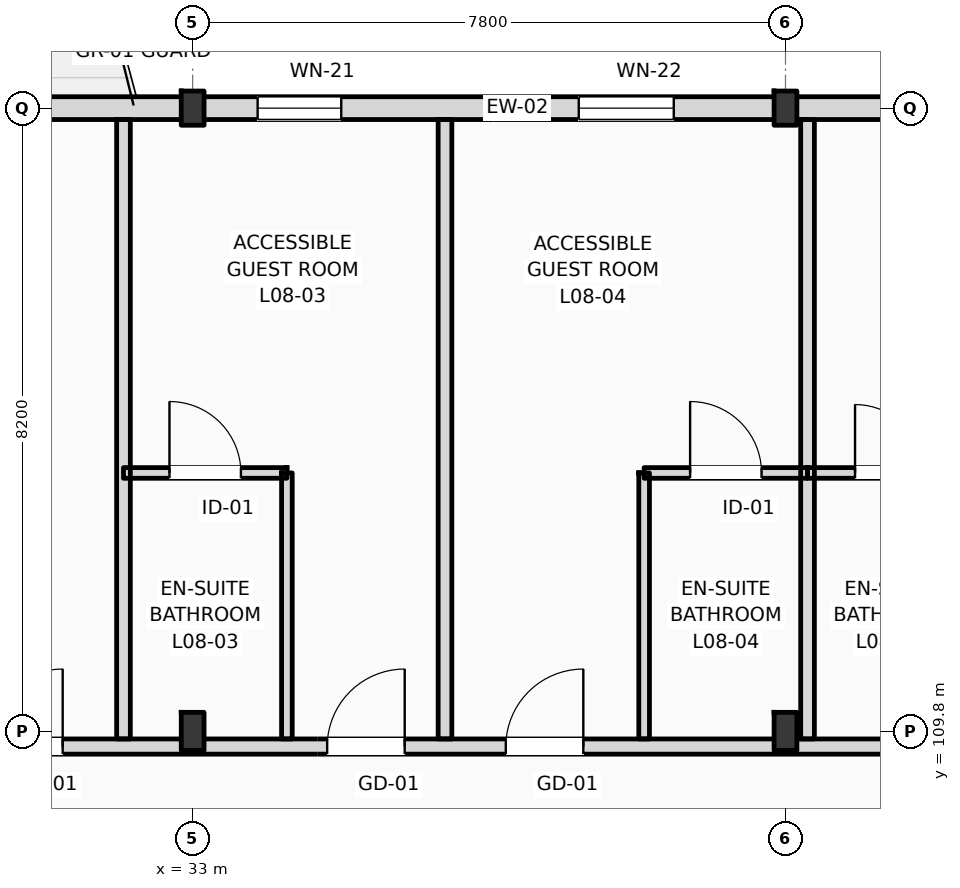
"""IFC4 building model, lengths in metres.
Left out: names, types, materials, properties, quantities, classifications, styles, units other than length and angle.
Written with IfcOpenShell. Run it as: python <this file> out.ifc"""

import sys

from ifc_helpers import new_model, si_unit, direction, frame, frame_2d, origin, origin_2d, place, context, subcontext, project, spatial, rectangle, i_section, extrude, element, fill, save


model = new_model("IFC4")
c1 = context("Model", 3, precision=1e-05, world=origin(), true_north=direction((0.0, 1.0)))
c2 = subcontext(c1, "Body", "Model", "MODEL_VIEW")
j1 = project(units=[si_unit("LENGTHUNIT", "METRE"), si_unit("PLANEANGLEUNIT", "RADIAN")], contexts=[c1])
p1 = place(None, origin())
s1 = spatial("IfcSite", under=j1, at=p1, CompositionType="ELEMENT")
p2 = place(p1, origin())
s2 = spatial("IfcBuilding", under=s1, at=p2, CompositionType="ELEMENT")
p3 = place(p2, frame((0.0, 0.0, 35.4)))
s3 = spatial("IfcBuildingStorey", under=s2, at=p3, CompositionType="ELEMENT", Elevation=35.4)
p4 = place(p3, frame((33.0, 109.8, 0.0), z_axis=(0.0, 0.0, 1.0), x_axis=(1.0, 0.0, 0.0)))
e1 = element("IfcColumn", 1, at=p4, inside=s3, PredefinedType="COLUMN", context=c2, shape_type="SweptSolid", body=[
    extrude(i_section(OverallWidth=0.3, OverallDepth=0.5, WebThickness=0.014, FlangeThickness=0.028, FilletRadius=0.027, at=origin_2d()), origin(), (0.0, 0.0, 1.0), 3.6),
])
p5 = place(p3, frame((33.0, 118.0, 0.0), z_axis=(0.0, 0.0, 1.0), x_axis=(1.0, 0.0, 0.0)))
e2 = element("IfcColumn", 2, at=p5, inside=s3, PredefinedType="COLUMN", context=c2, shape_type="SweptSolid", body=[
    extrude(i_section(OverallWidth=0.3, OverallDepth=0.45, WebThickness=0.014, FlangeThickness=0.026, FilletRadius=0.027, at=origin_2d()), origin(), (0.0, 0.0, 1.0), 3.6),
])
p6 = place(p3, frame((40.8, 109.8, 0.0), z_axis=(0.0, 0.0, 1.0), x_axis=(1.0, 0.0, 0.0)))
e3 = element("IfcColumn", 3, at=p6, inside=s3, PredefinedType="COLUMN", context=c2, shape_type="SweptSolid", body=[
    extrude(i_section(OverallWidth=0.3, OverallDepth=0.5, WebThickness=0.014, FlangeThickness=0.028, FilletRadius=0.027, at=origin_2d()), origin(), (0.0, 0.0, 1.0), 3.6),
])
p7 = place(p3, frame((40.8, 118.0, 0.0), z_axis=(0.0, 0.0, 1.0), x_axis=(1.0, 0.0, 0.0)))
e4 = element("IfcColumn", 4, at=p7, inside=s3, PredefinedType="COLUMN", context=c2, shape_type="SweptSolid", body=[
    extrude(i_section(OverallWidth=0.3, OverallDepth=0.45, WebThickness=0.014, FlangeThickness=0.026, FilletRadius=0.027, at=origin_2d()), origin(), (0.0, 0.0, 1.0), 3.6),
])
p8 = place(p3, frame((22.5, 118.0, 0.0), z_axis=(0.0, 0.0, 1.0), x_axis=(1.0, 0.0, 0.0)))
e5 = element("IfcWall", 5, at=p8, inside=s3, PredefinedType="STANDARD", context=c2, shape_type="SweptSolid", body=[
    extrude(rectangle(XDim=72.9, YDim=0.3, at=frame_2d((36.45, 0.0))), origin(), (0.0, 0.0, 1.0), 2.92),
])
p9 = place(p8, frame((0.91, 0.0, 0.9)))
e6 = element("IfcOpeningElement", 6, at=p9, cuts=e5, PredefinedType="OPENING", context=c2, shape_type="SweptSolid", body=[
    extrude(rectangle(XDim=0.9, YDim=1.84, at=frame_2d((0.45, 0.92))), frame((0.0, 0.16, 0.0), z_axis=(0.0, -1.0, 0.0), x_axis=(1.0, 0.0, 0.0)), (0.0, 0.0, 1.0), 0.32),
])
p10 = place(p8, frame((6.665, 0.0, 0.0)))
e7 = element("IfcOpeningElement", 7, at=p10, cuts=e5, PredefinedType="OPENING", context=c2, shape_type="SweptSolid", body=[
    extrude(rectangle(XDim=1.2, YDim=2.25, at=frame_2d((0.6, 1.125))), frame((0.0, 0.16, 0.0), z_axis=(0.0, -1.0, 0.0), x_axis=(1.0, 0.0, 0.0)), (0.0, 0.0, 1.0), 0.32),
])
p11 = place(p8, frame((11.355, 0.0, 0.9)))
e8 = element("IfcOpeningElement", 8, at=p11, cuts=e5, PredefinedType="OPENING", context=c2, shape_type="SweptSolid", body=[
    extrude(rectangle(XDim=1.1, YDim=1.5, at=frame_2d((0.55, 0.75))), frame((0.0, 0.16, 0.0), z_axis=(0.0, -1.0, 0.0), x_axis=(1.0, 0.0, 0.0)), (0.0, 0.0, 1.0), 0.32),
])
p12 = place(p8, frame((15.58, 0.0, 0.9)))
e9 = element("IfcOpeningElement", 9, at=p12, cuts=e5, PredefinedType="OPENING", context=c2, shape_type="SweptSolid", body=[
    extrude(rectangle(XDim=1.25, YDim=1.6, at=frame_2d((0.625, 0.8))), frame((0.0, 0.16, 0.0), z_axis=(0.0, -1.0, 0.0), x_axis=(1.0, 0.0, 0.0)), (0.0, 0.0, 1.0), 0.32),
])
p13 = place(p8, frame((21.08, 0.0, 0.0)))
e10 = element("IfcOpeningElement", 10, at=p13, cuts=e5, PredefinedType="OPENING", context=c2, shape_type="SweptSolid", body=[
    extrude(rectangle(XDim=1.2, YDim=2.25, at=frame_2d((0.6, 1.125))), frame((0.0, 0.16, 0.0), z_axis=(0.0, -1.0, 0.0), x_axis=(1.0, 0.0, 0.0)), (0.0, 0.0, 1.0), 0.32),
])
p14 = place(p8, frame((23.54, 0.0, 0.0)))
e11 = element("IfcOpeningElement", 11, at=p14, cuts=e5, PredefinedType="OPENING", context=c2, shape_type="SweptSolid", body=[
    extrude(rectangle(XDim=1.2, YDim=2.25, at=frame_2d((0.6, 1.125))), frame((0.0, 0.16, 0.0), z_axis=(0.0, -1.0, 0.0), x_axis=(1.0, 0.0, 0.0)), (0.0, 0.0, 1.0), 0.32),
])
p15 = place(p8, frame((28.83, 0.0, 0.9)))
e12 = element("IfcOpeningElement", 12, at=p15, cuts=e5, PredefinedType="OPENING", context=c2, shape_type="SweptSolid", body=[
    extrude(rectangle(XDim=1.75, YDim=1.84, at=frame_2d((0.875, 0.92))), frame((0.0, 0.16, 0.0), z_axis=(0.0, -1.0, 0.0), x_axis=(1.0, 0.0, 0.0)), (0.0, 0.0, 1.0), 0.32),
])
p16 = place(p8, frame((34.805, 0.0, 0.9)))
e13 = element("IfcOpeningElement", 13, at=p16, cuts=e5, PredefinedType="OPENING", context=c2, shape_type="SweptSolid", body=[
    extrude(rectangle(XDim=1.35, YDim=1.84, at=frame_2d((0.675, 0.92))), frame((0.0, 0.16, 0.0), z_axis=(0.0, -1.0, 0.0), x_axis=(1.0, 0.0, 0.0)), (0.0, 0.0, 1.0), 0.32),
])
p17 = place(p8, frame((38.105, 0.0, 0.0)))
e14 = element("IfcOpeningElement", 14, at=p17, cuts=e5, PredefinedType="OPENING", context=c2, shape_type="SweptSolid", body=[
    extrude(rectangle(XDim=1.2, YDim=2.25, at=frame_2d((0.6, 1.125))), frame((0.0, 0.16, 0.0), z_axis=(0.0, -1.0, 0.0), x_axis=(1.0, 0.0, 0.0)), (0.0, 0.0, 1.0), 0.32),
])
p18 = place(p8, frame((42.505, 0.0, 0.9)))
e15 = element("IfcOpeningElement", 15, at=p18, cuts=e5, PredefinedType="OPENING", context=c2, shape_type="SweptSolid", body=[
    extrude(rectangle(XDim=2.6, YDim=1.84, at=frame_2d((1.3, 0.92))), frame((0.0, 0.16, 0.0), z_axis=(0.0, -1.0, 0.0), x_axis=(1.0, 0.0, 0.0)), (0.0, 0.0, 1.0), 0.32),
])
p19 = place(p8, frame((46.2, 0.0, 0.9)))
e16 = element("IfcOpeningElement", 16, at=p19, cuts=e5, PredefinedType="OPENING", context=c2, shape_type="SweptSolid", body=[
    extrude(rectangle(XDim=1.8, YDim=1.84, at=frame_2d((0.9, 0.92))), frame((0.0, 0.16, 0.0), z_axis=(0.0, -1.0, 0.0), x_axis=(1.0, 0.0, 0.0)), (0.0, 0.0, 1.0), 0.32),
])
p20 = place(p8, frame((52.565, 0.0, 0.0)))
e17 = element("IfcOpeningElement", 17, at=p20, cuts=e5, PredefinedType="OPENING", context=c2, shape_type="SweptSolid", body=[
    extrude(rectangle(XDim=1.2, YDim=2.25, at=frame_2d((0.6, 1.125))), frame((0.0, 0.16, 0.0), z_axis=(0.0, -1.0, 0.0), x_axis=(1.0, 0.0, 0.0)), (0.0, 0.0, 1.0), 0.32),
])
p21 = place(p8, frame((55.305, 0.0, 0.9)))
e18 = element("IfcOpeningElement", 18, at=p21, cuts=e5, PredefinedType="OPENING", context=c2, shape_type="SweptSolid", body=[
    extrude(rectangle(XDim=1.2, YDim=1.8, at=frame_2d((0.6, 0.9))), frame((0.0, 0.16, 0.0), z_axis=(0.0, -1.0, 0.0), x_axis=(1.0, 0.0, 0.0)), (0.0, 0.0, 1.0), 0.32),
])
p22 = place(p8, frame((60.53, 0.0, 0.9)))
e19 = element("IfcOpeningElement", 19, at=p22, cuts=e5, PredefinedType="OPENING", context=c2, shape_type="SweptSolid", body=[
    extrude(rectangle(XDim=1.35, YDim=1.84, at=frame_2d((0.675, 0.92))), frame((0.0, 0.16, 0.0), z_axis=(0.0, -1.0, 0.0), x_axis=(1.0, 0.0, 0.0)), (0.0, 0.0, 1.0), 0.32),
])
p23 = place(p8, frame((65.955, 0.0, 0.9)))
e20 = element("IfcOpeningElement", 20, at=p23, cuts=e5, PredefinedType="OPENING", context=c2, shape_type="SweptSolid", body=[
    extrude(rectangle(XDim=1.35, YDim=1.84, at=frame_2d((0.675, 0.92))), frame((0.0, 0.16, 0.0), z_axis=(0.0, -1.0, 0.0), x_axis=(1.0, 0.0, 0.0)), (0.0, 0.0, 1.0), 0.32),
])
p24 = place(p8, frame((69.335, 0.0, 0.9)))
e21 = element("IfcOpeningElement", 21, at=p24, cuts=e5, PredefinedType="OPENING", context=c2, shape_type="SweptSolid", body=[
    extrude(rectangle(XDim=1.65, YDim=1.84, at=frame_2d((0.825, 0.92))), frame((0.0, 0.16, 0.0), z_axis=(0.0, -1.0, 0.0), x_axis=(1.0, 0.0, 0.0)), (0.0, 0.0, 1.0), 0.32),
])
p25 = place(p3, frame((10.65, 109.6, 0.0), z_axis=(0.0, 0.0, 1.0), x_axis=(1.0, 0.0, 0.0)))
e22 = element("IfcWall", 22, at=p25, inside=s3, PredefinedType="PARTITIONING", context=c2, shape_type="SweptSolid", body=[
    extrude(rectangle(XDim=84.61, YDim=0.2, at=frame_2d((42.305, 0.0))), origin(), (0.0, 0.0, 1.0), 2.82),
])
p26 = place(p25, frame((12.675, 0.0, 0.0)))
e23 = element("IfcOpeningElement", 23, at=p26, cuts=e22, PredefinedType="OPENING", context=c2, shape_type="SweptSolid", body=[
    extrude(rectangle(XDim=1.02, YDim=2.2, at=frame_2d((0.51, 1.1))), frame((0.0, 0.11, 0.0), z_axis=(0.0, -1.0, 0.0), x_axis=(1.0, 0.0, 0.0)), (0.0, 0.0, 1.0), 0.22),
])
p27 = place(p25, frame((19.62, 0.0, 0.0)))
e24 = element("IfcOpeningElement", 24, at=p27, cuts=e22, PredefinedType="OPENING", context=c2, shape_type="SweptSolid", body=[
    extrude(rectangle(XDim=1.02, YDim=2.2, at=frame_2d((0.51, 1.1))), frame((0.0, 0.11, 0.0), z_axis=(0.0, -1.0, 0.0), x_axis=(1.0, 0.0, 0.0)), (0.0, 0.0, 1.0), 0.22),
])
p28 = place(p25, frame((24.12, 0.0, 0.0)))
e25 = element("IfcOpeningElement", 25, at=p28, cuts=e22, PredefinedType="OPENING", context=c2, shape_type="SweptSolid", body=[
    extrude(rectangle(XDim=1.02, YDim=2.2, at=frame_2d((0.51, 1.1))), frame((0.0, 0.11, 0.0), z_axis=(0.0, -1.0, 0.0), x_axis=(1.0, 0.0, 0.0)), (0.0, 0.0, 1.0), 0.22),
])
p29 = place(p25, frame((26.47, 0.0, 0.0)))
e26 = element("IfcOpeningElement", 26, at=p29, cuts=e22, PredefinedType="OPENING", context=c2, shape_type="SweptSolid", body=[
    extrude(rectangle(XDim=1.02, YDim=2.2, at=frame_2d((0.51, 1.1))), frame((0.0, 0.11, 0.0), z_axis=(0.0, -1.0, 0.0), x_axis=(1.0, 0.0, 0.0)), (0.0, 0.0, 1.0), 0.22),
])
p30 = place(p25, frame((33.15, 0.0, 0.0)))
e27 = element("IfcOpeningElement", 27, at=p30, cuts=e22, PredefinedType="OPENING", context=c2, shape_type="SweptSolid", body=[
    extrude(rectangle(XDim=0.96, YDim=2.2, at=frame_2d((0.48, 1.1))), frame((0.0, 0.11, 0.0), z_axis=(0.0, -1.0, 0.0), x_axis=(1.0, 0.0, 0.0)), (0.0, 0.0, 1.0), 0.22),
])
p31 = place(p25, frame((35.5, 0.0, 0.0)))
e28 = element("IfcOpeningElement", 28, at=p31, cuts=e22, PredefinedType="OPENING", context=c2, shape_type="SweptSolid", body=[
    extrude(rectangle(XDim=0.96, YDim=2.2, at=frame_2d((0.48, 1.1))), frame((0.0, 0.11, 0.0), z_axis=(0.0, -1.0, 0.0), x_axis=(1.0, 0.0, 0.0)), (0.0, 0.0, 1.0), 0.22),
])
p32 = place(p25, frame((42.15, 0.0, 0.0)))
e29 = element("IfcOpeningElement", 29, at=p32, cuts=e22, PredefinedType="OPENING", context=c2, shape_type="SweptSolid", body=[
    extrude(rectangle(XDim=0.96, YDim=2.2, at=frame_2d((0.48, 1.1))), frame((0.0, 0.11, 0.0), z_axis=(0.0, -1.0, 0.0), x_axis=(1.0, 0.0, 0.0)), (0.0, 0.0, 1.0), 0.22),
])
p33 = place(p25, frame((47.15, 0.0, 0.0)))
e30 = element("IfcOpeningElement", 30, at=p33, cuts=e22, PredefinedType="OPENING", context=c2, shape_type="SweptSolid", body=[
    extrude(rectangle(XDim=0.96, YDim=2.2, at=frame_2d((0.48, 1.1))), frame((0.0, 0.11, 0.0), z_axis=(0.0, -1.0, 0.0), x_axis=(1.0, 0.0, 0.0)), (0.0, 0.0, 1.0), 0.22),
])
p34 = place(p25, frame((51.15, 0.0, 0.0)))
e31 = element("IfcOpeningElement", 31, at=p34, cuts=e22, PredefinedType="OPENING", context=c2, shape_type="SweptSolid", body=[
    extrude(rectangle(XDim=0.96, YDim=2.2, at=frame_2d((0.48, 1.1))), frame((0.0, 0.11, 0.0), z_axis=(0.0, -1.0, 0.0), x_axis=(1.0, 0.0, 0.0)), (0.0, 0.0, 1.0), 0.22),
])
p35 = place(p25, frame((55.65, 0.0, 0.0)))
e32 = element("IfcOpeningElement", 32, at=p35, cuts=e22, PredefinedType="OPENING", context=c2, shape_type="SweptSolid", body=[
    extrude(rectangle(XDim=0.96, YDim=2.2, at=frame_2d((0.48, 1.1))), frame((0.0, 0.11, 0.0), z_axis=(0.0, -1.0, 0.0), x_axis=(1.0, 0.0, 0.0)), (0.0, 0.0, 1.0), 0.22),
])
p36 = place(p25, frame((58.0, 0.0, 0.0)))
e33 = element("IfcOpeningElement", 33, at=p36, cuts=e22, PredefinedType="OPENING", context=c2, shape_type="SweptSolid", body=[
    extrude(rectangle(XDim=0.96, YDim=2.2, at=frame_2d((0.48, 1.1))), frame((0.0, 0.11, 0.0), z_axis=(0.0, -1.0, 0.0), x_axis=(1.0, 0.0, 0.0)), (0.0, 0.0, 1.0), 0.22),
])
p37 = place(p25, frame((64.65, 0.0, 0.0)))
e34 = element("IfcOpeningElement", 34, at=p37, cuts=e22, PredefinedType="OPENING", context=c2, shape_type="SweptSolid", body=[
    extrude(rectangle(XDim=0.96, YDim=2.2, at=frame_2d((0.48, 1.1))), frame((0.0, 0.11, 0.0), z_axis=(0.0, -1.0, 0.0), x_axis=(1.0, 0.0, 0.0)), (0.0, 0.0, 1.0), 0.22),
])
p38 = place(p25, frame((66.75, 0.0, 0.0)))
e35 = element("IfcOpeningElement", 35, at=p38, cuts=e22, PredefinedType="OPENING", context=c2, shape_type="SweptSolid", body=[
    extrude(rectangle(XDim=0.96, YDim=2.2, at=frame_2d((0.48, 1.1))), frame((0.0, 0.11, 0.0), z_axis=(0.0, -1.0, 0.0), x_axis=(1.0, 0.0, 0.0)), (0.0, 0.0, 1.0), 0.22),
])
p39 = place(p25, frame((73.65, 0.0, 0.0)))
e36 = element("IfcOpeningElement", 36, at=p39, cuts=e22, PredefinedType="OPENING", context=c2, shape_type="SweptSolid", body=[
    extrude(rectangle(XDim=0.96, YDim=2.2, at=frame_2d((0.48, 1.1))), frame((0.0, 0.11, 0.0), z_axis=(0.0, -1.0, 0.0), x_axis=(1.0, 0.0, 0.0)), (0.0, 0.0, 1.0), 0.22),
])
p40 = place(p25, frame((78.4, 0.0, 0.0)))
e37 = element("IfcOpeningElement", 37, at=p40, cuts=e22, PredefinedType="OPENING", context=c2, shape_type="SweptSolid", body=[
    extrude(rectangle(XDim=0.96, YDim=2.2, at=frame_2d((0.48, 1.1))), frame((0.0, 0.11, 0.0), z_axis=(0.0, -1.0, 0.0), x_axis=(1.0, 0.0, 0.0)), (0.0, 0.0, 1.0), 0.22),
])
p41 = place(p25, frame((80.455, 0.0, 0.0)))
e38 = element("IfcOpeningElement", 38, at=p41, cuts=e22, PredefinedType="OPENING", context=c2, shape_type="SweptSolid", body=[
    extrude(rectangle(XDim=0.96, YDim=2.2, at=frame_2d((0.48, 1.1))), frame((0.0, 0.11, 0.0), z_axis=(0.0, -1.0, 0.0), x_axis=(1.0, 0.0, 0.0)), (0.0, 0.0, 1.0), 0.22),
])
p42 = place(p25, frame((2.716, 0.0, 0.0)))
e39 = element("IfcOpeningElement", 39, at=p42, cuts=e22, PredefinedType="OPENING", context=c2, shape_type="SweptSolid", body=[
    extrude(rectangle(XDim=1.35, YDim=2.25, at=frame_2d((0.675, 1.125))), frame((0.0, 0.11, 0.0), z_axis=(0.0, -1.0, 0.0), x_axis=(1.0, 0.0, 0.0)), (0.0, 0.0, 1.0), 0.22),
])
p43 = place(p25, frame((6.65, 0.0, 0.0)))
e40 = element("IfcOpeningElement", 40, at=p43, cuts=e22, PredefinedType="OPENING", context=c2, shape_type="SweptSolid", body=[
    extrude(rectangle(XDim=1.35, YDim=2.25, at=frame_2d((0.675, 1.125))), frame((0.0, 0.11, 0.0), z_axis=(0.0, -1.0, 0.0), x_axis=(1.0, 0.0, 0.0)), (0.0, 0.0, 1.0), 0.22),
])
p44 = place(p25, frame((10.583, 0.0, 0.0)))
e41 = element("IfcOpeningElement", 41, at=p44, cuts=e22, PredefinedType="OPENING", context=c2, shape_type="SweptSolid", body=[
    extrude(rectangle(XDim=1.35, YDim=2.25, at=frame_2d((0.675, 1.125))), frame((0.0, 0.11, 0.0), z_axis=(0.0, -1.0, 0.0), x_axis=(1.0, 0.0, 0.0)), (0.0, 0.0, 1.0), 0.22),
])
for number, where, z_axis, x_axis in (
    (42, (32.09, 109.7, 0.0), (0.0, 0.0, 1.0), (0.0, 1.0, 0.0)),
    (43, (36.32, 109.7, 0.0), (0.0, 0.0, 1.0), (0.0, 1.0, 0.0)),
):
    element("IfcWall", number, at=place(p3, frame(where, z_axis=z_axis, x_axis=x_axis)), inside=s3, PredefinedType="PARTITIONING", context=c2, shape_type="SweptSolid", body=[
        extrude(rectangle(XDim=8.15, YDim=0.18, at=frame_2d((4.075, 0.0))), origin(), (0.0, 0.0, 1.0), 3.38),
    ])
p45 = place(p3, frame((34.24, 109.7, 0.0), z_axis=(0.0, 0.0, 1.0), x_axis=(0.0, 1.0, 0.0)))
e44 = element("IfcWall", 44, at=p45, inside=s3, PredefinedType="PARTITIONING", context=c2, shape_type="SweptSolid", body=[
    extrude(rectangle(XDim=3.5, YDim=0.14, at=frame_2d((1.75, 0.0))), origin(), (0.0, 0.0, 1.0), 3.38),
])
p46 = place(p3, frame((32.09, 113.2, 0.0), z_axis=(0.0, 0.0, 1.0), x_axis=(1.0, 0.0, 0.0)))
e45 = element("IfcWall", 45, at=p46, inside=s3, PredefinedType="PARTITIONING", context=c2, shape_type="SweptSolid", body=[
    extrude(rectangle(XDim=2.15, YDim=0.14, at=frame_2d((1.075, 0.0))), origin(), (0.0, 0.0, 1.0), 3.38),
])
p47 = place(p46, frame((0.605, 0.0, 0.0)))
e46 = element("IfcOpeningElement", 46, at=p47, cuts=e45, PredefinedType="OPENING", context=c2, shape_type="SweptSolid", body=[
    extrude(rectangle(XDim=0.94, YDim=2.15, at=frame_2d((0.47, 1.075))), frame((0.0, 0.08, 0.0), z_axis=(0.0, -1.0, 0.0), x_axis=(1.0, 0.0, 0.0)), (0.0, 0.0, 1.0), 0.16),
])
p48 = place(p3, frame((41.09, 109.7, 0.0), z_axis=(0.0, 0.0, 1.0), x_axis=(0.0, 1.0, 0.0)))
e47 = element("IfcWall", 47, at=p48, inside=s3, PredefinedType="PARTITIONING", context=c2, shape_type="SweptSolid", body=[
    extrude(rectangle(XDim=8.15, YDim=0.18, at=frame_2d((4.075, 0.0))), origin(), (0.0, 0.0, 1.0), 3.38),
])
p49 = place(p3, frame((38.94, 109.7, 0.0), z_axis=(0.0, 0.0, 1.0), x_axis=(0.0, 1.0, 0.0)))
e48 = element("IfcWall", 48, at=p49, inside=s3, PredefinedType="PARTITIONING", context=c2, shape_type="SweptSolid", body=[
    extrude(rectangle(XDim=3.5, YDim=0.14, at=frame_2d((1.75, 0.0))), origin(), (0.0, 0.0, 1.0), 3.38),
])
p50 = place(p3, frame((38.94, 113.2, 0.0), z_axis=(0.0, 0.0, 1.0), x_axis=(1.0, 0.0, 0.0)))
e49 = element("IfcWall", 49, at=p50, inside=s3, PredefinedType="PARTITIONING", context=c2, shape_type="SweptSolid", body=[
    extrude(rectangle(XDim=2.15, YDim=0.14, at=frame_2d((1.075, 0.0))), origin(), (0.0, 0.0, 1.0), 3.38),
])
p51 = place(p50, frame((0.605, 0.0, 0.0)))
e50 = element("IfcOpeningElement", 50, at=p51, cuts=e49, PredefinedType="OPENING", context=c2, shape_type="SweptSolid", body=[
    extrude(rectangle(XDim=0.94, YDim=2.15, at=frame_2d((0.47, 1.075))), frame((0.0, 0.08, 0.0), z_axis=(0.0, -1.0, 0.0), x_axis=(1.0, 0.0, 0.0)), (0.0, 0.0, 1.0), 0.16),
])
p52 = place(p3, frame((41.09, 113.2, 0.0), z_axis=(0.0, 0.0, 1.0), x_axis=(1.0, 0.0, 0.0)))
e51 = element("IfcWall", 51, at=p52, inside=s3, PredefinedType="PARTITIONING", context=c2, shape_type="SweptSolid", body=[
    extrude(rectangle(XDim=2.15, YDim=0.14, at=frame_2d((1.075, 0.0))), origin(), (0.0, 0.0, 1.0), 3.38),
])
p53 = place(p52, frame((0.625, 0.0, 0.0)))
e52 = element("IfcOpeningElement", 52, at=p53, cuts=e51, PredefinedType="OPENING", context=c2, shape_type="SweptSolid", body=[
    extrude(rectangle(XDim=0.9, YDim=2.1, at=frame_2d((0.45, 1.05))), frame((0.0, 0.08, 0.0), z_axis=(0.0, -1.0, 0.0), x_axis=(1.0, 0.0, 0.0)), (0.0, 0.0, 1.0), 0.16),
])
p54 = place(p11, origin())
e53 = element("IfcWindow", 53, at=p54, inside=s3, PartitioningType="DOUBLE_PANEL_VERTICAL", PredefinedType="WINDOW", context=c2, shape_type="SweptSolid", body=[
    extrude(rectangle(XDim=1.1, YDim=1.5, at=frame_2d((0.55, 0.75))), frame((0.0, 0.03, 0.0), z_axis=(0.0, -1.0, 0.0), x_axis=(1.0, 0.0, 0.0)), (0.0, 0.0, 1.0), 0.06),
])
fill(e8, e53)
p55 = place(p12, origin())
e54 = element("IfcWindow", 54, at=p55, inside=s3, PartitioningType="DOUBLE_PANEL_VERTICAL", PredefinedType="WINDOW", context=c2, shape_type="SweptSolid", body=[
    extrude(rectangle(XDim=1.25, YDim=1.6, at=frame_2d((0.625, 0.8))), frame((0.0, 0.03, 0.0), z_axis=(0.0, -1.0, 0.0), x_axis=(1.0, 0.0, 0.0)), (0.0, 0.0, 1.0), 0.06),
])
fill(e9, e54)
p56 = place(p27, origin())
e55 = element("IfcDoor", 55, at=p56, inside=s3, OperationType="SINGLE_SWING_RIGHT", PredefinedType="DOOR", context=c2, shape_type="SweptSolid", body=[
    extrude(rectangle(XDim=1.02, YDim=2.2, at=frame_2d((0.51, 1.1))), frame((0.0, 0.025, 0.0), z_axis=(0.0, -1.0, 0.0), x_axis=(1.0, 0.0, 0.0)), (0.0, 0.0, 1.0), 0.05),
])
fill(e24, e55)
p57 = place(p28, origin())
e56 = element("IfcDoor", 56, at=p57, inside=s3, OperationType="SINGLE_SWING_RIGHT", PredefinedType="DOOR", context=c2, shape_type="SweptSolid", body=[
    extrude(rectangle(XDim=1.02, YDim=2.2, at=frame_2d((0.51, 1.1))), frame((0.0, 0.025, 0.0), z_axis=(0.0, -1.0, 0.0), x_axis=(1.0, 0.0, 0.0)), (0.0, 0.0, 1.0), 0.05),
])
fill(e25, e56)
p58 = place(p47, origin())
e57 = element("IfcDoor", 57, at=p58, inside=s3, OperationType="SINGLE_SWING_LEFT", PredefinedType="DOOR", context=c2, shape_type="SweptSolid", body=[
    extrude(rectangle(XDim=0.94, YDim=2.15, at=frame_2d((0.47, 1.075))), frame((0.0, 0.025, 0.0), z_axis=(0.0, -1.0, 0.0), x_axis=(1.0, 0.0, 0.0)), (0.0, 0.0, 1.0), 0.05),
])
fill(e46, e57)
p59 = place(p29, origin())
e58 = element("IfcDoor", 58, at=p59, inside=s3, OperationType="SINGLE_SWING_RIGHT", PredefinedType="DOOR", context=c2, shape_type="SweptSolid", body=[
    extrude(rectangle(XDim=1.02, YDim=2.2, at=frame_2d((0.51, 1.1))), frame((0.0, 0.025, 0.0), z_axis=(0.0, -1.0, 0.0), x_axis=(1.0, 0.0, 0.0)), (0.0, 0.0, 1.0), 0.05),
])
fill(e26, e58)
p60 = place(p51, origin())
e59 = element("IfcDoor", 59, at=p60, inside=s3, OperationType="SINGLE_SWING_LEFT", PredefinedType="DOOR", context=c2, shape_type="SweptSolid", body=[
    extrude(rectangle(XDim=0.94, YDim=2.15, at=frame_2d((0.47, 1.075))), frame((0.0, 0.025, 0.0), z_axis=(0.0, -1.0, 0.0), x_axis=(1.0, 0.0, 0.0)), (0.0, 0.0, 1.0), 0.05),
])
fill(e50, e59)
p61 = place(p53, origin())
e60 = element("IfcDoor", 60, at=p61, inside=s3, OperationType="SINGLE_SWING_LEFT", PredefinedType="DOOR", context=c2, shape_type="SweptSolid", body=[
    extrude(rectangle(XDim=0.9, YDim=2.1, at=frame_2d((0.45, 1.05))), frame((0.0, 0.025, 0.0), z_axis=(0.0, -1.0, 0.0), x_axis=(1.0, 0.0, 0.0)), (0.0, 0.0, 1.0), 0.05),
])
fill(e52, e60)
save(model, sys.argv[1])
